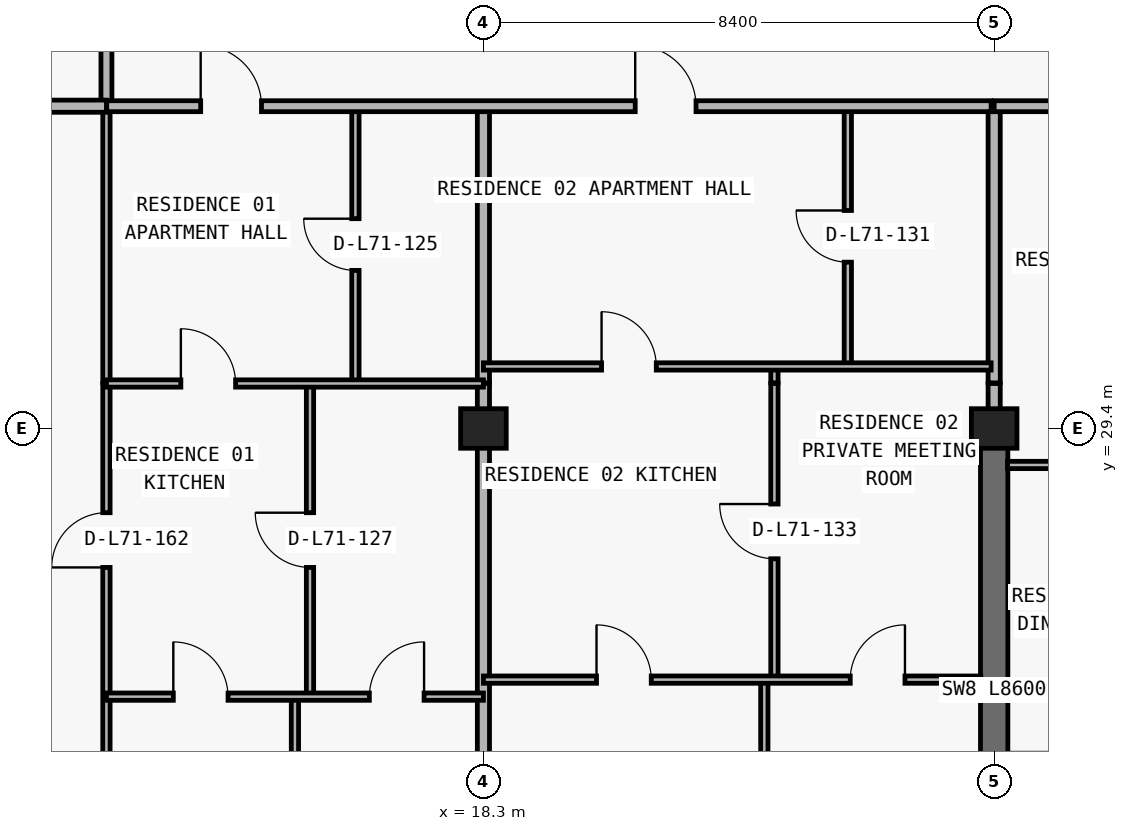
"""IFC4 building model, lengths in metres.
Left out: names, types, materials, properties, quantities, classifications, styles, units other than length and angle.
Written with IfcOpenShell. Run it as: python <this file> out.ifc"""

import sys

from ifc_helpers import new_model, si_unit, direction, frame, frame_2d, origin, origin_2d, place, context, subcontext, project, spatial, rectangle, extrude, element, fill, save


model = new_model("IFC4")
c1 = context("Model", 3, precision=1e-05, world=origin(), true_north=direction((0.0, 1.0)))
c2 = subcontext(c1, "Body", "Model", "MODEL_VIEW")
j1 = project(units=[si_unit("LENGTHUNIT", "METRE"), si_unit("PLANEANGLEUNIT", "RADIAN")], contexts=[c1])
p1 = place(None, origin())
s1 = spatial("IfcSite", under=j1, at=p1, CompositionType="ELEMENT")
p2 = place(p1, origin())
s2 = spatial("IfcBuilding", under=s1, at=p2, CompositionType="ELEMENT")
p3 = place(p2, frame((0.0, 0.0, 252.9)))
s3 = spatial("IfcBuildingStorey", under=s2, at=p3, CompositionType="ELEMENT", Elevation=252.9)
for number, where, z_axis, x_axis in (
    (1, (18.3, 29.4, 0.0), (0.0, 0.0, 1.0), (1.0, 0.0, 0.0)),
    (2, (26.7, 29.4, 0.0), (0.0, 0.0, 1.0), (1.0, 0.0, 0.0)),
):
    element("IfcColumn", number, at=place(p3, frame(where, z_axis=z_axis, x_axis=x_axis)), inside=s3, PredefinedType="COLUMN", context=c2, shape_type="SweptSolid", body=[
        extrude(rectangle(XDim=0.75, YDim=0.65, at=origin_2d()), origin(), (0.0, 0.0, 1.0), 3.05),
    ])
p4 = place(p3, frame((26.7, 20.8, 0.0), z_axis=(0.0, 0.0, 1.0), x_axis=(0.0, 1.0, 0.0)))
e3 = element("IfcWall", 3, at=p4, inside=s3, PredefinedType="SHEAR", context=c2, shape_type="SweptSolid", body=[
    extrude(rectangle(XDim=8.6, YDim=0.45, at=frame_2d((4.3, 0.0))), origin(), (0.0, 0.0, 1.0), 3.05),
])
p5 = place(p3, frame((12.1, 13.385, 0.0), z_axis=(0.0, 0.0, 1.0), x_axis=(0.0, 1.0, 0.0)))
e4 = element("IfcWall", 4, at=p5, inside=s3, PredefinedType="PARTITIONING", context=c2, shape_type="SweptSolid", body=[
    extrude(rectangle(XDim=16.755, YDim=0.12, at=frame_2d((8.377, 0.0))), origin(), (0.0, 0.0, 1.0), 3.05),
])
p6 = place(p5, frame((13.73, 0.0, 0.0)))
e5 = element("IfcOpeningElement", 5, at=p6, cuts=e4, PredefinedType="OPENING", context=c2, shape_type="SweptSolid", body=[
    extrude(rectangle(XDim=0.9, YDim=2.15, at=frame_2d((0.45, 1.075))), frame((0.0, 0.07, 0.0), z_axis=(0.0, -1.0, 0.0), x_axis=(1.0, 0.0, 0.0)), (0.0, 0.0, 1.0), 0.14),
])
p7 = place(p3, frame((12.1, 30.15, 0.0), z_axis=(0.0, 0.0, 1.0), x_axis=(0.0, 1.0, 0.0)))
e6 = element("IfcWall", 6, at=p7, inside=s3, PredefinedType="PARTITIONING", context=c2, shape_type="SweptSolid", body=[
    extrude(rectangle(XDim=4.55, YDim=0.12, at=frame_2d((2.275, 0.0))), origin(), (0.0, 0.0, 1.0), 3.05),
])
p8 = place(p3, frame((12.1, 34.705, 0.0), z_axis=(0.0, 0.0, 1.0), x_axis=(0.0, 1.0, 0.0)))
e7 = element("IfcWall", 7, at=p8, inside=s3, PredefinedType="PARTITIONING", context=c2, shape_type="SweptSolid", body=[
    extrude(rectangle(XDim=2.295, YDim=0.18, at=frame_2d((1.147, 0.0))), origin(), (0.0, 0.0, 1.0), 3.05),
])
p9 = place(p3, frame((15.2, 13.34, 0.0), z_axis=(0.0, 0.0, 1.0), x_axis=(0.0, 1.0, 0.0)))
e8 = element("IfcWall", 8, at=p9, inside=s3, PredefinedType="PARTITIONING", context=c2, shape_type="SweptSolid", body=[
    extrude(rectangle(XDim=11.65, YDim=0.12, at=frame_2d((5.825, 0.0))), origin(), (0.0, 0.0, 1.0), 3.05),
])
p10 = place(p3, frame((15.448, 24.99, 0.0), z_axis=(0.0, 0.0, 1.0), x_axis=(0.0, 1.0, 0.0)))
e9 = element("IfcWall", 9, at=p10, inside=s3, PredefinedType="PARTITIONING", context=c2, shape_type="SweptSolid", body=[
    extrude(rectangle(XDim=5.15, YDim=0.12, at=frame_2d((2.575, 0.0))), origin(), (0.0, 0.0, 1.0), 3.05),
])
p11 = place(p10, frame((2.125, 0.0, 0.0)))
e10 = element("IfcOpeningElement", 10, at=p11, cuts=e9, PredefinedType="OPENING", context=c2, shape_type="SweptSolid", body=[
    extrude(rectangle(XDim=0.9, YDim=2.15, at=frame_2d((0.45, 1.075))), frame((0.0, 0.07, 0.0), z_axis=(0.0, -1.0, 0.0), x_axis=(1.0, 0.0, 0.0)), (0.0, 0.0, 1.0), 0.14),
])
p12 = place(p3, frame((16.195, 30.15, 0.0), z_axis=(0.0, 0.0, 1.0), x_axis=(0.0, 1.0, 0.0)))
e11 = element("IfcWall", 11, at=p12, inside=s3, PredefinedType="PARTITIONING", context=c2, shape_type="SweptSolid", body=[
    extrude(rectangle(XDim=4.55, YDim=0.12, at=frame_2d((2.275, 0.0))), origin(), (0.0, 0.0, 1.0), 3.05),
])
p13 = place(p12, frame((1.85, 0.0, 0.0)))
e12 = element("IfcOpeningElement", 12, at=p13, cuts=e11, PredefinedType="OPENING", context=c2, shape_type="SweptSolid", body=[
    extrude(rectangle(XDim=0.85, YDim=2.1, at=frame_2d((0.425, 1.05))), frame((0.0, 0.07, 0.0), z_axis=(0.0, -1.0, 0.0), x_axis=(1.0, 0.0, 0.0)), (0.0, 0.0, 1.0), 0.14),
])
p14 = place(p3, frame((18.3, 13.34, 0.0), z_axis=(0.0, 0.0, 1.0), x_axis=(0.0, 1.0, 0.0)))
e13 = element("IfcWall", 13, at=p14, inside=s3, PredefinedType="PARTITIONING", context=c2, shape_type="SweptSolid", body=[
    extrude(rectangle(XDim=16.8, YDim=0.2, at=frame_2d((8.4, 0.0))), origin(), (0.0, 0.0, 1.0), 2.263),
])
p15 = place(p3, frame((18.3, 30.15, 0.0), z_axis=(0.0, 0.0, 1.0), x_axis=(0.0, 1.0, 0.0)))
e14 = element("IfcWall", 14, at=p15, inside=s3, PredefinedType="PARTITIONING", context=c2, shape_type="SweptSolid", body=[
    extrude(rectangle(XDim=4.55, YDim=0.2, at=frame_2d((2.275, 0.0))), origin(), (0.0, 0.0, 1.0), 2.263),
])
p16 = place(p3, frame((22.92, 13.34, 0.0), z_axis=(0.0, 0.0, 1.0), x_axis=(0.0, 1.0, 0.0)))
e15 = element("IfcWall", 15, at=p16, inside=s3, PredefinedType="PARTITIONING", context=c2, shape_type="SweptSolid", body=[
    extrude(rectangle(XDim=11.93, YDim=0.12, at=frame_2d((5.965, 0.0))), origin(), (0.0, 0.0, 1.0), 3.05),
])
p17 = place(p3, frame((23.086, 25.275, 0.0), z_axis=(0.0, 0.0, 1.0), x_axis=(0.0, 1.0, 0.0)))
e16 = element("IfcWall", 16, at=p17, inside=s3, PredefinedType="PARTITIONING", context=c2, shape_type="SweptSolid", body=[
    extrude(rectangle(XDim=4.865, YDim=0.12, at=frame_2d((2.433, 0.0))), origin(), (0.0, 0.0, 1.0), 3.05),
])
p18 = place(p17, frame((1.982, 0.0, 0.0)))
e17 = element("IfcOpeningElement", 17, at=p18, cuts=e16, PredefinedType="OPENING", context=c2, shape_type="SweptSolid", body=[
    extrude(rectangle(XDim=0.9, YDim=2.15, at=frame_2d((0.45, 1.075))), frame((0.0, 0.07, 0.0), z_axis=(0.0, -1.0, 0.0), x_axis=(1.0, 0.0, 0.0)), (0.0, 0.0, 1.0), 0.14),
])
p19 = place(p3, frame((23.086, 30.15, 0.0), z_axis=(0.0, 0.0, 1.0), x_axis=(0.0, 1.0, 0.0)))
e18 = element("IfcWall", 18, at=p19, inside=s3, PredefinedType="PARTITIONING", context=c2, shape_type="SweptSolid", body=[
    extrude(rectangle(XDim=0.27, YDim=0.12, at=frame_2d((0.135, 0.0))), origin(), (0.0, 0.0, 1.0), 3.05),
])
p20 = place(p3, frame((24.293, 30.42, 0.0), z_axis=(0.0, 0.0, 1.0), x_axis=(0.0, 1.0, 0.0)))
e19 = element("IfcWall", 19, at=p20, inside=s3, PredefinedType="PARTITIONING", context=c2, shape_type="SweptSolid", body=[
    extrude(rectangle(XDim=4.28, YDim=0.12, at=frame_2d((2.14, 0.0))), origin(), (0.0, 0.0, 1.0), 3.05),
])
p21 = place(p20, frame((1.715, 0.0, 0.0)))
e20 = element("IfcOpeningElement", 20, at=p21, cuts=e19, PredefinedType="OPENING", context=c2, shape_type="SweptSolid", body=[
    extrude(rectangle(XDim=0.85, YDim=2.1, at=frame_2d((0.425, 1.05))), frame((0.0, 0.07, 0.0), z_axis=(0.0, -1.0, 0.0), x_axis=(1.0, 0.0, 0.0)), (0.0, 0.0, 1.0), 0.14),
])
p22 = place(p3, frame((26.7, 29.405, 0.0), z_axis=(0.0, 0.0, 1.0), x_axis=(0.0, 1.0, 0.0)))
e21 = element("IfcWall", 21, at=p22, inside=s3, PredefinedType="PARTITIONING", context=c2, shape_type="SweptSolid", body=[
    extrude(rectangle(XDim=0.735, YDim=0.2, at=frame_2d((0.367, 0.0))), origin(), (0.0, 0.0, 1.0), 2.335),
])
p23 = place(p3, frame((26.7, 30.15, 0.0), z_axis=(0.0, 0.0, 1.0), x_axis=(0.0, 1.0, 0.0)))
e22 = element("IfcWall", 22, at=p23, inside=s3, PredefinedType="PARTITIONING", context=c2, shape_type="SweptSolid", body=[
    extrude(rectangle(XDim=4.55, YDim=0.2, at=frame_2d((2.275, 0.0))), origin(), (0.0, 0.0, 1.0), 2.335),
])
p24 = place(p3, frame((12.1, 24.99, 0.0), z_axis=(0.0, 0.0, 1.0), x_axis=(1.0, 0.0, 0.0)))
e23 = element("IfcWall", 23, at=p24, inside=s3, PredefinedType="PARTITIONING", context=c2, shape_type="SweptSolid", body=[
    extrude(rectangle(XDim=6.2, YDim=0.12, at=frame_2d((3.1, 0.0))), origin(), (0.0, 0.0, 1.0), 3.05),
])
p25 = place(p24, frame((1.1, 0.0, 0.0)))
e24 = element("IfcOpeningElement", 24, at=p25, cuts=e23, PredefinedType="OPENING", context=c2, shape_type="SweptSolid", body=[
    extrude(rectangle(XDim=0.9, YDim=2.15, at=frame_2d((0.45, 1.075))), frame((0.0, 0.07, 0.0), z_axis=(0.0, -1.0, 0.0), x_axis=(1.0, 0.0, 0.0)), (0.0, 0.0, 1.0), 0.14),
])
p26 = place(p24, frame((4.324, 0.0, 0.0)))
e25 = element("IfcOpeningElement", 25, at=p26, cuts=e23, PredefinedType="OPENING", context=c2, shape_type="SweptSolid", body=[
    extrude(rectangle(XDim=0.9, YDim=2.15, at=frame_2d((0.45, 1.075))), frame((0.0, 0.07, 0.0), z_axis=(0.0, -1.0, 0.0), x_axis=(1.0, 0.0, 0.0)), (0.0, 0.0, 1.0), 0.14),
])
p27 = place(p3, frame((18.3, 25.27, 0.0), z_axis=(0.0, 0.0, 1.0), x_axis=(1.0, 0.0, 0.0)))
e26 = element("IfcWall", 26, at=p27, inside=s3, PredefinedType="PARTITIONING", context=c2, shape_type="SweptSolid", body=[
    extrude(rectangle(XDim=8.18, YDim=0.12, at=frame_2d((4.09, 0.0))), origin(), (0.0, 0.0, 1.0), 3.05),
])
p28 = place(p27, frame((1.86, 0.0, 0.0)))
e27 = element("IfcOpeningElement", 27, at=p28, cuts=e26, PredefinedType="OPENING", context=c2, shape_type="SweptSolid", body=[
    extrude(rectangle(XDim=0.9, YDim=2.15, at=frame_2d((0.45, 1.075))), frame((0.0, 0.07, 0.0), z_axis=(0.0, -1.0, 0.0), x_axis=(1.0, 0.0, 0.0)), (0.0, 0.0, 1.0), 0.14),
])
p29 = place(p27, frame((6.033, 0.0, 0.0)))
e28 = element("IfcOpeningElement", 28, at=p29, cuts=e26, PredefinedType="OPENING", context=c2, shape_type="SweptSolid", body=[
    extrude(rectangle(XDim=0.9, YDim=2.15, at=frame_2d((0.45, 1.075))), frame((0.0, 0.07, 0.0), z_axis=(0.0, -1.0, 0.0), x_axis=(1.0, 0.0, 0.0)), (0.0, 0.0, 1.0), 0.14),
])
p30 = place(p3, frame((26.92, 28.8, 0.0), z_axis=(0.0, 0.0, 1.0), x_axis=(1.0, 0.0, 0.0)))
e29 = element("IfcWall", 29, at=p30, inside=s3, PredefinedType="PARTITIONING", context=c2, shape_type="SweptSolid", body=[
    extrude(rectangle(XDim=8.175, YDim=0.12, at=frame_2d((4.087, 0.0))), origin(), (0.0, 0.0, 1.0), 3.05),
])
p31 = place(p30, frame((1.33, 0.0, 0.0)))
e30 = element("IfcOpeningElement", 30, at=p31, cuts=e29, PredefinedType="OPENING", context=c2, shape_type="SweptSolid", body=[
    extrude(rectangle(XDim=0.9, YDim=2.15, at=frame_2d((0.45, 1.075))), frame((0.0, 0.07, 0.0), z_axis=(0.0, -1.0, 0.0), x_axis=(1.0, 0.0, 0.0)), (0.0, 0.0, 1.0), 0.14),
])
p32 = place(p3, frame((12.1, 30.14, 0.0), z_axis=(0.0, 0.0, 1.0), x_axis=(1.0, 0.0, 0.0)))
e31 = element("IfcWall", 31, at=p32, inside=s3, PredefinedType="PARTITIONING", context=c2, shape_type="SweptSolid", body=[
    extrude(rectangle(XDim=6.2, YDim=0.12, at=frame_2d((3.1, 0.0))), origin(), (0.0, 0.0, 1.0), 3.05),
])
p33 = place(p32, frame((1.224, 0.0, 0.0)))
e32 = element("IfcOpeningElement", 32, at=p33, cuts=e31, PredefinedType="OPENING", context=c2, shape_type="SweptSolid", body=[
    extrude(rectangle(XDim=0.9, YDim=2.15, at=frame_2d((0.45, 1.075))), frame((0.0, 0.07, 0.0), z_axis=(0.0, -1.0, 0.0), x_axis=(1.0, 0.0, 0.0)), (0.0, 0.0, 1.0), 0.14),
])
p34 = place(p3, frame((18.3, 30.42, 0.0), z_axis=(0.0, 0.0, 1.0), x_axis=(1.0, 0.0, 0.0)))
e33 = element("IfcWall", 33, at=p34, inside=s3, PredefinedType="PARTITIONING", context=c2, shape_type="SweptSolid", body=[
    extrude(rectangle(XDim=8.35, YDim=0.12, at=frame_2d((4.175, 0.0))), origin(), (0.0, 0.0, 1.0), 3.05),
])
p35 = place(p34, frame((1.943, 0.0, 0.0)))
e34 = element("IfcOpeningElement", 34, at=p35, cuts=e33, PredefinedType="OPENING", context=c2, shape_type="SweptSolid", body=[
    extrude(rectangle(XDim=0.9, YDim=2.15, at=frame_2d((0.45, 1.075))), frame((0.0, 0.07, 0.0), z_axis=(0.0, -1.0, 0.0), x_axis=(1.0, 0.0, 0.0)), (0.0, 0.0, 1.0), 0.14),
])
p36 = place(p3, frame((8.395, 34.7, 0.0), z_axis=(0.0, 0.0, 1.0), x_axis=(1.0, 0.0, 0.0)))
e35 = element("IfcWall", 35, at=p36, inside=s3, PredefinedType="PARTITIONING", context=c2, shape_type="SweptSolid", body=[
    extrude(rectangle(XDim=3.705, YDim=0.2, at=frame_2d((1.853, 0.0))), origin(), (0.0, 0.0, 1.0), 3.05),
])
p37 = place(p3, frame((12.105, 34.7, 0.0), z_axis=(0.0, 0.0, 1.0), x_axis=(1.0, 0.0, 0.0)))
e36 = element("IfcWall", 36, at=p37, inside=s3, PredefinedType="PARTITIONING", context=c2, shape_type="SweptSolid", body=[
    extrude(rectangle(XDim=14.545, YDim=0.18, at=frame_2d((7.272, 0.0))), origin(), (0.0, 0.0, 1.0), 3.05),
])
p38 = place(p37, frame((1.545, 0.0, 0.0)))
e37 = element("IfcOpeningElement", 37, at=p38, cuts=e36, PredefinedType="OPENING", context=c2, shape_type="SweptSolid", body=[
    extrude(rectangle(XDim=1.0, YDim=2.2, at=frame_2d((0.5, 1.1))), frame((0.0, 0.1, 0.0), z_axis=(0.0, -1.0, 0.0), x_axis=(1.0, 0.0, 0.0)), (0.0, 0.0, 1.0), 0.2),
])
p39 = place(p37, frame((8.691, 0.0, 0.0)))
e38 = element("IfcOpeningElement", 38, at=p39, cuts=e36, PredefinedType="OPENING", context=c2, shape_type="SweptSolid", body=[
    extrude(rectangle(XDim=1.0, YDim=2.2, at=frame_2d((0.5, 1.1))), frame((0.0, 0.1, 0.0), z_axis=(0.0, -1.0, 0.0), x_axis=(1.0, 0.0, 0.0)), (0.0, 0.0, 1.0), 0.2),
])
p40 = place(p3, frame((26.7, 34.7, 0.0), z_axis=(0.0, 0.0, 1.0), x_axis=(1.0, 0.0, 0.0)))
e39 = element("IfcWall", 39, at=p40, inside=s3, PredefinedType="PARTITIONING", context=c2, shape_type="SweptSolid", body=[
    extrude(rectangle(XDim=39.0, YDim=0.18, at=frame_2d((19.5, 0.0))), origin(), (0.0, 0.0, 1.0), 3.05),
])
p41 = place(p40, frame((2.827, 0.0, 0.0)))
e40 = element("IfcOpeningElement", 40, at=p41, cuts=e39, PredefinedType="OPENING", context=c2, shape_type="SweptSolid", body=[
    extrude(rectangle(XDim=1.0, YDim=2.2, at=frame_2d((0.5, 1.1))), frame((0.0, 0.1, 0.0), z_axis=(0.0, -1.0, 0.0), x_axis=(1.0, 0.0, 0.0)), (0.0, 0.0, 1.0), 0.2),
])
p42 = place(p40, frame((27.27, 0.0, 0.0)))
e41 = element("IfcOpeningElement", 41, at=p42, cuts=e39, PredefinedType="OPENING", context=c2, shape_type="SweptSolid", body=[
    extrude(rectangle(XDim=1.0, YDim=2.2, at=frame_2d((0.5, 1.1))), frame((0.0, 0.1, 0.0), z_axis=(0.0, -1.0, 0.0), x_axis=(1.0, 0.0, 0.0)), (0.0, 0.0, 1.0), 0.2),
])
p43 = place(p38, origin())
e42 = element("IfcDoor", 42, at=p43, inside=s3, OperationType="SINGLE_SWING_LEFT", PredefinedType="DOOR", context=c2, shape_type="SweptSolid", body=[
    extrude(rectangle(XDim=1.0, YDim=2.2, at=frame_2d((0.5, 1.1))), frame((0.0, 0.025, 0.0), z_axis=(0.0, -1.0, 0.0), x_axis=(1.0, 0.0, 0.0)), (0.0, 0.0, 1.0), 0.05),
])
fill(e37, e42)
p44 = place(p13, origin())
e43 = element("IfcDoor", 43, at=p44, inside=s3, OperationType="SINGLE_SWING_RIGHT", PredefinedType="DOOR", context=c2, shape_type="SweptSolid", body=[
    extrude(rectangle(XDim=0.85, YDim=2.1, at=frame_2d((0.425, 1.05))), frame((0.0, 0.025, 0.0), z_axis=(0.0, -1.0, 0.0), x_axis=(1.0, 0.0, 0.0)), (0.0, 0.0, 1.0), 0.05),
])
fill(e12, e43)
p45 = place(p33, origin())
e44 = element("IfcDoor", 44, at=p45, inside=s3, OperationType="SINGLE_SWING_LEFT", PredefinedType="DOOR", context=c2, shape_type="SweptSolid", body=[
    extrude(rectangle(XDim=0.9, YDim=2.15, at=frame_2d((0.45, 1.075))), frame((0.0, 0.025, 0.0), z_axis=(0.0, -1.0, 0.0), x_axis=(1.0, 0.0, 0.0)), (0.0, 0.0, 1.0), 0.05),
])
fill(e32, e44)
p46 = place(p11, origin())
e45 = element("IfcDoor", 45, at=p46, inside=s3, OperationType="SINGLE_SWING_RIGHT", PredefinedType="DOOR", context=c2, shape_type="SweptSolid", body=[
    extrude(rectangle(XDim=0.9, YDim=2.15, at=frame_2d((0.45, 1.075))), frame((0.0, 0.025, 0.0), z_axis=(0.0, -1.0, 0.0), x_axis=(1.0, 0.0, 0.0)), (0.0, 0.0, 1.0), 0.05),
])
fill(e10, e45)
p47 = place(p25, origin())
e46 = element("IfcDoor", 46, at=p47, inside=s3, OperationType="SINGLE_SWING_LEFT", PredefinedType="DOOR", context=c2, shape_type="SweptSolid", body=[
    extrude(rectangle(XDim=0.9, YDim=2.15, at=frame_2d((0.45, 1.075))), frame((0.0, 0.025, 0.0), z_axis=(0.0, -1.0, 0.0), x_axis=(1.0, 0.0, 0.0)), (0.0, 0.0, 1.0), 0.05),
])
fill(e24, e46)
p48 = place(p26, origin())
e47 = element("IfcDoor", 47, at=p48, inside=s3, OperationType="SINGLE_SWING_RIGHT", PredefinedType="DOOR", context=c2, shape_type="SweptSolid", body=[
    extrude(rectangle(XDim=0.9, YDim=2.15, at=frame_2d((0.45, 1.075))), frame((0.0, 0.025, 0.0), z_axis=(0.0, -1.0, 0.0), x_axis=(1.0, 0.0, 0.0)), (0.0, 0.0, 1.0), 0.05),
])
fill(e25, e47)
p49 = place(p39, origin())
e48 = element("IfcDoor", 48, at=p49, inside=s3, OperationType="SINGLE_SWING_LEFT", PredefinedType="DOOR", context=c2, shape_type="SweptSolid", body=[
    extrude(rectangle(XDim=1.0, YDim=2.2, at=frame_2d((0.5, 1.1))), frame((0.0, 0.025, 0.0), z_axis=(0.0, -1.0, 0.0), x_axis=(1.0, 0.0, 0.0)), (0.0, 0.0, 1.0), 0.05),
])
fill(e38, e48)
p50 = place(p21, origin())
e49 = element("IfcDoor", 49, at=p50, inside=s3, OperationType="SINGLE_SWING_RIGHT", PredefinedType="DOOR", context=c2, shape_type="SweptSolid", body=[
    extrude(rectangle(XDim=0.85, YDim=2.1, at=frame_2d((0.425, 1.05))), frame((0.0, 0.025, 0.0), z_axis=(0.0, -1.0, 0.0), x_axis=(1.0, 0.0, 0.0)), (0.0, 0.0, 1.0), 0.05),
])
fill(e20, e49)
p51 = place(p35, origin())
e50 = element("IfcDoor", 50, at=p51, inside=s3, OperationType="SINGLE_SWING_LEFT", PredefinedType="DOOR", context=c2, shape_type="SweptSolid", body=[
    extrude(rectangle(XDim=0.9, YDim=2.15, at=frame_2d((0.45, 1.075))), frame((0.0, 0.025, 0.0), z_axis=(0.0, -1.0, 0.0), x_axis=(1.0, 0.0, 0.0)), (0.0, 0.0, 1.0), 0.05),
])
fill(e34, e50)
p52 = place(p18, origin())
e51 = element("IfcDoor", 51, at=p52, inside=s3, OperationType="SINGLE_SWING_RIGHT", PredefinedType="DOOR", context=c2, shape_type="SweptSolid", body=[
    extrude(rectangle(XDim=0.9, YDim=2.15, at=frame_2d((0.45, 1.075))), frame((0.0, 0.025, 0.0), z_axis=(0.0, -1.0, 0.0), x_axis=(1.0, 0.0, 0.0)), (0.0, 0.0, 1.0), 0.05),
])
fill(e17, e51)
p53 = place(p28, origin())
e52 = element("IfcDoor", 52, at=p53, inside=s3, OperationType="SINGLE_SWING_LEFT", PredefinedType="DOOR", context=c2, shape_type="SweptSolid", body=[
    extrude(rectangle(XDim=0.9, YDim=2.15, at=frame_2d((0.45, 1.075))), frame((0.0, 0.025, 0.0), z_axis=(0.0, -1.0, 0.0), x_axis=(1.0, 0.0, 0.0)), (0.0, 0.0, 1.0), 0.05),
])
fill(e27, e52)
p54 = place(p29, origin())
e53 = element("IfcDoor", 53, at=p54, inside=s3, OperationType="SINGLE_SWING_RIGHT", PredefinedType="DOOR", context=c2, shape_type="SweptSolid", body=[
    extrude(rectangle(XDim=0.9, YDim=2.15, at=frame_2d((0.45, 1.075))), frame((0.0, 0.025, 0.0), z_axis=(0.0, -1.0, 0.0), x_axis=(1.0, 0.0, 0.0)), (0.0, 0.0, 1.0), 0.05),
])
fill(e28, e53)
p55 = place(p6, origin())
e54 = element("IfcDoor", 54, at=p55, inside=s3, OperationType="SINGLE_SWING_LEFT", PredefinedType="DOOR", context=c2, shape_type="SweptSolid", body=[
    extrude(rectangle(XDim=0.9, YDim=2.15, at=frame_2d((0.45, 1.075))), frame((0.0, 0.025, 0.0), z_axis=(0.0, -1.0, 0.0), x_axis=(1.0, 0.0, 0.0)), (0.0, 0.0, 1.0), 0.05),
])
fill(e5, e54)
save(model, sys.argv[1])
